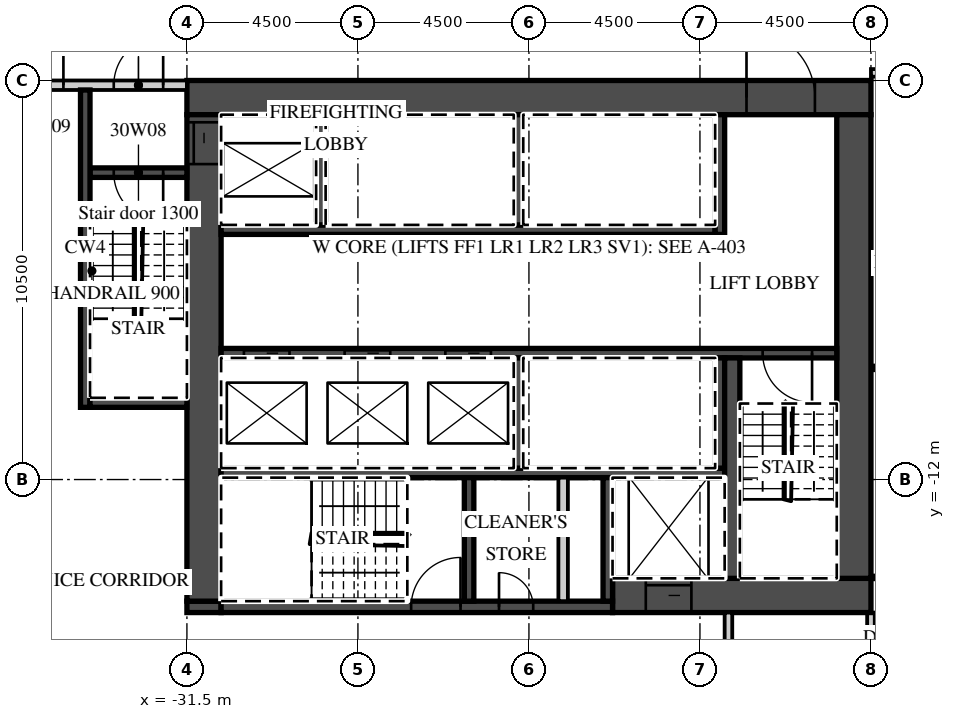
"""IFC4 building model, lengths in metres.
Left out: names, types, materials, properties, quantities, classifications, styles, units other than length and angle.
Written with IfcOpenShell. Run it as: python <this file> out.ifc"""

import sys

from ifc_helpers import new_model, si_unit, direction, frame, frame_2d, origin, place, context, subcontext, project, spatial, rectangle, extrude, element, fill, save


model = new_model("IFC4")
c1 = context("Model", 3, precision=1e-05, world=origin(), true_north=direction((0.0, 1.0)))
c2 = subcontext(c1, "Body", "Model", "MODEL_VIEW")
j1 = project(units=[si_unit("LENGTHUNIT", "METRE"), si_unit("PLANEANGLEUNIT", "RADIAN")], contexts=[c1])
p1 = place(None, origin())
s1 = spatial("IfcSite", under=j1, at=p1, CompositionType="ELEMENT")
p2 = place(p1, origin())
s2 = spatial("IfcBuilding", under=s1, at=p2, CompositionType="ELEMENT")
p3 = place(p2, frame((0.0, 0.0, 133.9)))
s3 = spatial("IfcBuildingStorey", under=s2, at=p3, CompositionType="ELEMENT", Elevation=133.9)
p4 = place(p3, frame((-13.5, -22.232, 0.0), z_axis=(0.0, 0.0, 1.0), x_axis=(0.0, 1.0, 0.0)))
e1 = element("IfcWall", 1, at=p4, inside=s3, PredefinedType="PARTITIONING", context=c2, shape_type="SweptSolid", body=[
    extrude(rectangle(XDim=6.732, YDim=0.2, at=frame_2d((3.366, 0.0))), origin(), (0.0, 0.0, 1.0), 3.02),
])
p5 = place(p3, frame((-13.5, -1.3, 0.0), z_axis=(0.0, 0.0, 1.0), x_axis=(1.0, 0.0, 0.0)))
e2 = element("IfcWall", 2, at=p5, inside=s3, PredefinedType="PARTITIONING", context=c2, shape_type="SweptSolid", body=[
    extrude(rectangle(XDim=60.932, YDim=0.2, at=frame_2d((30.466, 0.0))), origin(), (0.0, 0.0, 1.0), 3.02),
])
p6 = place(p5, frame((2.925, 0.0, 0.0)))
e3 = element("IfcOpeningElement", 3, at=p6, cuts=e2, PredefinedType="OPENING", context=c2, shape_type="SweptSolid", body=[
    extrude(rectangle(XDim=1.0, YDim=2.1, at=frame_2d((0.5, 1.05))), frame((0.0, 0.11, 0.0), z_axis=(0.0, -1.0, 0.0), x_axis=(1.0, 0.0, 0.0)), (0.0, 0.0, 1.0), 0.22),
])
p7 = place(p5, frame((9.863, 0.0, 0.0)))
e4 = element("IfcOpeningElement", 4, at=p7, cuts=e2, PredefinedType="OPENING", context=c2, shape_type="SweptSolid", body=[
    extrude(rectangle(XDim=1.2, YDim=2.1, at=frame_2d((0.6, 1.05))), frame((0.0, 0.11, 0.0), z_axis=(0.0, -1.0, 0.0), x_axis=(1.0, 0.0, 0.0)), (0.0, 0.0, 1.0), 0.22),
])
p8 = place(p5, frame((14.075, 0.0, 0.0)))
e5 = element("IfcOpeningElement", 5, at=p8, cuts=e2, PredefinedType="OPENING", context=c2, shape_type="SweptSolid", body=[
    extrude(rectangle(XDim=1.0, YDim=2.1, at=frame_2d((0.5, 1.05))), frame((0.0, 0.11, 0.0), z_axis=(0.0, -1.0, 0.0), x_axis=(1.0, 0.0, 0.0)), (0.0, 0.0, 1.0), 0.22),
])
p9 = place(p5, frame((18.55, 0.0, 0.0)))
e6 = element("IfcOpeningElement", 6, at=p9, cuts=e2, PredefinedType="OPENING", context=c2, shape_type="SweptSolid", body=[
    extrude(rectangle(XDim=1.0, YDim=2.1, at=frame_2d((0.5, 1.05))), frame((0.0, 0.11, 0.0), z_axis=(0.0, -1.0, 0.0), x_axis=(1.0, 0.0, 0.0)), (0.0, 0.0, 1.0), 0.22),
])
p10 = place(p5, frame((24.938, 0.0, 0.0)))
e7 = element("IfcOpeningElement", 7, at=p10, cuts=e2, PredefinedType="OPENING", context=c2, shape_type="SweptSolid", body=[
    extrude(rectangle(XDim=1.2, YDim=2.1, at=frame_2d((0.6, 1.05))), frame((0.0, 0.11, 0.0), z_axis=(0.0, -1.0, 0.0), x_axis=(1.0, 0.0, 0.0)), (0.0, 0.0, 1.0), 0.22),
])
p11 = place(p5, frame((36.862, 0.0, 0.0)))
e8 = element("IfcOpeningElement", 8, at=p11, cuts=e2, PredefinedType="OPENING", context=c2, shape_type="SweptSolid", body=[
    extrude(rectangle(XDim=1.2, YDim=2.1, at=frame_2d((0.6, 1.05))), frame((0.0, 0.11, 0.0), z_axis=(0.0, -1.0, 0.0), x_axis=(1.0, 0.0, 0.0)), (0.0, 0.0, 1.0), 0.22),
])
p12 = place(p5, frame((41.075, 0.0, 0.0)))
e9 = element("IfcOpeningElement", 9, at=p12, cuts=e2, PredefinedType="OPENING", context=c2, shape_type="SweptSolid", body=[
    extrude(rectangle(XDim=1.0, YDim=2.1, at=frame_2d((0.5, 1.05))), frame((0.0, 0.11, 0.0), z_axis=(0.0, -1.0, 0.0), x_axis=(1.0, 0.0, 0.0)), (0.0, 0.0, 1.0), 0.22),
])
p13 = place(p5, frame((45.55, 0.0, 0.0)))
e10 = element("IfcOpeningElement", 10, at=p13, cuts=e2, PredefinedType="OPENING", context=c2, shape_type="SweptSolid", body=[
    extrude(rectangle(XDim=1.0, YDim=2.1, at=frame_2d((0.5, 1.05))), frame((0.0, 0.11, 0.0), z_axis=(0.0, -1.0, 0.0), x_axis=(1.0, 0.0, 0.0)), (0.0, 0.0, 1.0), 0.22),
])
p14 = place(p5, frame((52.425, 0.0, 0.0)))
e11 = element("IfcOpeningElement", 11, at=p14, cuts=e2, PredefinedType="OPENING", context=c2, shape_type="SweptSolid", body=[
    extrude(rectangle(XDim=1.0, YDim=2.1, at=frame_2d((0.5, 1.05))), frame((0.0, 0.11, 0.0), z_axis=(0.0, -1.0, 0.0), x_axis=(1.0, 0.0, 0.0)), (0.0, 0.0, 1.0), 0.22),
])
p15 = place(p5, frame((56.95, 0.0, 0.0)))
e12 = element("IfcOpeningElement", 12, at=p15, cuts=e2, PredefinedType="OPENING", context=c2, shape_type="SweptSolid", body=[
    extrude(rectangle(XDim=1.0, YDim=2.1, at=frame_2d((0.5, 1.05))), frame((0.0, 0.11, 0.0), z_axis=(0.0, -1.0, 0.0), x_axis=(1.0, 0.0, 0.0)), (0.0, 0.0, 1.0), 0.22),
])
p16 = place(p5, frame((59.882, 0.0, 0.0)))
e13 = element("IfcOpeningElement", 13, at=p16, cuts=e2, PredefinedType="OPENING", context=c2, shape_type="SweptSolid", body=[
    extrude(rectangle(XDim=0.9, YDim=2.1, at=frame_2d((0.45, 1.05))), frame((0.0, 0.11, 0.0), z_axis=(0.0, -1.0, 0.0), x_axis=(1.0, 0.0, 0.0)), (0.0, 0.0, 1.0), 0.22),
])
p17 = place(p3, frame((-31.5, -1.95, 0.0), z_axis=(0.0, 0.0, 1.0), x_axis=(1.0, 0.0, 0.0)))
e14 = element("IfcWall", 14, at=p17, inside=s3, PredefinedType="SHEAR", context=c2, shape_type="SweptSolid", body=[
    extrude(rectangle(XDim=18.0, YDim=0.9, at=frame_2d((9.0, 0.0))), origin(), (0.0, 0.0, 1.0), 3.02),
])
p18 = place(p17, frame((14.725, 0.0, 0.0)))
e15 = element("IfcOpeningElement", 15, at=p18, cuts=e14, PredefinedType="OPENING", context=c2, shape_type="SweptSolid", body=[
    extrude(rectangle(XDim=1.8, YDim=2.1, at=frame_2d((0.9, 1.05))), frame((0.0, 0.46, 0.0), z_axis=(0.0, -1.0, 0.0), x_axis=(1.0, 0.0, 0.0)), (0.0, 0.0, 1.0), 0.92),
])
p19 = place(p3, frame((-20.3, -15.05, 0.0), z_axis=(0.0, 0.0, 1.0), x_axis=(1.0, 0.0, 0.0)))
e16 = element("IfcWall", 16, at=p19, inside=s3, PredefinedType="SHEAR", context=c2, shape_type="SweptSolid", body=[
    extrude(rectangle(XDim=6.8, YDim=0.9, at=frame_2d((3.4, 0.0))), origin(), (0.0, 0.0, 1.0), 3.02),
])
p20 = place(p19, frame((0.875, 0.0, 0.0)))
e17 = element("IfcOpeningElement", 17, at=p20, cuts=e16, PredefinedType="OPENING", context=c2, shape_type="SweptSolid", body=[
    extrude(rectangle(XDim=1.2, YDim=2.1, at=frame_2d((0.6, 1.05))), frame((0.0, 0.46, 0.0), z_axis=(0.0, -1.0, 0.0), x_axis=(1.0, 0.0, 0.0)), (0.0, 0.0, 1.0), 0.92),
])
p21 = place(p3, frame((-31.5, -15.35, 0.0), z_axis=(0.0, 0.0, 1.0), x_axis=(1.0, 0.0, 0.0)))
e18 = element("IfcWall", 18, at=p21, inside=s3, PredefinedType="SHEAR", context=c2, shape_type="SweptSolid", body=[
    extrude(rectangle(XDim=0.9, YDim=0.3, at=frame_2d((0.45, 0.0))), origin(), (0.0, 0.0, 1.0), 3.02),
])
p22 = place(p3, frame((-30.6, -15.35, 0.0), z_axis=(0.0, 0.0, 1.0), x_axis=(1.0, 0.0, 0.0)))
e19 = element("IfcWall", 19, at=p22, inside=s3, PredefinedType="SHEAR", context=c2, shape_type="SweptSolid", body=[
    extrude(rectangle(XDim=10.3, YDim=0.3, at=frame_2d((5.15, 0.0))), origin(), (0.0, 0.0, 1.0), 3.02),
])
p23 = place(p22, frame((5.0, 0.0, 0.0)))
e20 = element("IfcOpeningElement", 20, at=p23, cuts=e19, PredefinedType="OPENING", context=c2, shape_type="SweptSolid", body=[
    extrude(rectangle(XDim=1.3, YDim=2.1, at=frame_2d((0.65, 1.05))), frame((0.0, 0.16, 0.0), z_axis=(0.0, -1.0, 0.0), x_axis=(1.0, 0.0, 0.0)), (0.0, 0.0, 1.0), 0.32),
])
p24 = place(p22, frame((7.312, 0.0, 0.0)))
e21 = element("IfcOpeningElement", 21, at=p24, cuts=e19, PredefinedType="OPENING", context=c2, shape_type="SweptSolid", body=[
    extrude(rectangle(XDim=0.9, YDim=2.1, at=frame_2d((0.45, 1.05))), frame((0.0, 0.16, 0.0), z_axis=(0.0, -1.0, 0.0), x_axis=(1.0, 0.0, 0.0)), (0.0, 0.0, 1.0), 0.32),
])
p25 = place(p3, frame((-31.05, -15.2, 0.0), z_axis=(0.0, 0.0, 1.0), x_axis=(0.0, 1.0, 0.0)))
e22 = element("IfcWall", 22, at=p25, inside=s3, PredefinedType="SHEAR", context=c2, shape_type="SweptSolid", body=[
    extrude(rectangle(XDim=12.8, YDim=0.9, at=frame_2d((6.4, 0.0))), origin(), (0.0, 0.0, 1.0), 3.02),
])
p26 = place(p25, frame((11.5, 0.0, 0.0)))
e23 = element("IfcOpeningElement", 23, at=p26, cuts=e22, PredefinedType="OPENING", context=c2, shape_type="SweptSolid", body=[
    extrude(rectangle(XDim=1.1, YDim=2.1, at=frame_2d((0.55, 1.05))), frame((0.0, 0.46, 0.0), z_axis=(0.0, -1.0, 0.0), x_axis=(1.0, 0.0, 0.0)), (0.0, 0.0, 1.0), 0.92),
])
p27 = place(p3, frame((-13.95, -14.6, 0.0), z_axis=(0.0, 0.0, 1.0), x_axis=(0.0, 1.0, 0.0)))
e24 = element("IfcWall", 24, at=p27, inside=s3, PredefinedType="SHEAR", context=c2, shape_type="SweptSolid", body=[
    extrude(rectangle(XDim=12.2, YDim=0.9, at=frame_2d((6.1, 0.0))), origin(), (0.0, 0.0, 1.0), 3.02),
])
p28 = place(p3, frame((-30.6, -5.425, 0.0), z_axis=(0.0, 0.0, 1.0), x_axis=(1.0, 0.0, 0.0)))
e25 = element("IfcWall", 25, at=p28, inside=s3, PredefinedType="SHEAR", context=c2, shape_type="SweptSolid", body=[
    extrude(rectangle(XDim=13.0, YDim=0.25, at=frame_2d((6.5, 0.0))), origin(), (0.0, 0.0, 1.0), 3.02),
])
p29 = place(p3, frame((-17.475, -5.55, 0.0), z_axis=(0.0, 0.0, 1.0), x_axis=(0.0, 1.0, 0.0)))
e26 = element("IfcWall", 26, at=p29, inside=s3, PredefinedType="SHEAR", context=c2, shape_type="SweptSolid", body=[
    extrude(rectangle(XDim=3.15, YDim=0.25, at=frame_2d((1.575, 0.0))), origin(), (0.0, 0.0, 1.0), 3.02),
])
for number, where, z_axis, x_axis in (
    (27, (-27.975, -5.3, 0.0), (0.0, 0.0, 1.0), (0.0, 1.0, 0.0)),
    (28, (-22.775, -5.3, 0.0), (0.0, 0.0, 1.0), (0.0, 1.0, 0.0)),
):
    element("IfcWall", number, at=place(p3, frame(where, z_axis=z_axis, x_axis=x_axis)), inside=s3, PredefinedType="SHEAR", context=c2, shape_type="SweptSolid", body=[
        extrude(rectangle(XDim=2.9, YDim=0.25, at=frame_2d((1.45, 0.0))), origin(), (0.0, 0.0, 1.0), 3.02),
    ])
p30 = place(p3, frame((-30.6, -8.675, 0.0), z_axis=(0.0, 0.0, 1.0), x_axis=(1.0, 0.0, 0.0)))
e29 = element("IfcWall", 29, at=p30, inside=s3, PredefinedType="SHEAR", context=c2, shape_type="SweptSolid", body=[
    extrude(rectangle(XDim=16.2, YDim=0.25, at=frame_2d((8.1, 0.0))), origin(), (0.0, 0.0, 1.0), 3.02),
])
p31 = place(p30, frame((0.6, 0.0, 0.0)))
e30 = element("IfcOpeningElement", 30, at=p31, cuts=e29, PredefinedType="OPENING", context=c2, shape_type="SweptSolid", body=[
    extrude(rectangle(XDim=1.2, YDim=2.1, at=frame_2d((0.6, 1.05))), frame((0.0, 0.135, 0.0), z_axis=(0.0, -1.0, 0.0), x_axis=(1.0, 0.0, 0.0)), (0.0, 0.0, 1.0), 0.27),
])
p32 = place(p30, frame((3.25, 0.0, 0.0)))
e31 = element("IfcOpeningElement", 31, at=p32, cuts=e29, PredefinedType="OPENING", context=c2, shape_type="SweptSolid", body=[
    extrude(rectangle(XDim=1.2, YDim=2.1, at=frame_2d((0.6, 1.05))), frame((0.0, 0.135, 0.0), z_axis=(0.0, -1.0, 0.0), x_axis=(1.0, 0.0, 0.0)), (0.0, 0.0, 1.0), 0.27),
])
p33 = place(p30, frame((5.9, 0.0, 0.0)))
e32 = element("IfcOpeningElement", 32, at=p33, cuts=e29, PredefinedType="OPENING", context=c2, shape_type="SweptSolid", body=[
    extrude(rectangle(XDim=1.2, YDim=2.1, at=frame_2d((0.6, 1.05))), frame((0.0, 0.135, 0.0), z_axis=(0.0, -1.0, 0.0), x_axis=(1.0, 0.0, 0.0)), (0.0, 0.0, 1.0), 0.27),
])
p34 = place(p30, frame((14.25, 0.0, 0.0)))
e33 = element("IfcOpeningElement", 33, at=p34, cuts=e29, PredefinedType="OPENING", context=c2, shape_type="SweptSolid", body=[
    extrude(rectangle(XDim=1.3, YDim=2.1, at=frame_2d((0.65, 1.05))), frame((0.0, 0.135, 0.0), z_axis=(0.0, -1.0, 0.0), x_axis=(1.0, 0.0, 0.0)), (0.0, 0.0, 1.0), 0.27),
])
p35 = place(p3, frame((-30.6, -11.825, 0.0), z_axis=(0.0, 0.0, 1.0), x_axis=(1.0, 0.0, 0.0)))
e34 = element("IfcWall", 34, at=p35, inside=s3, PredefinedType="SHEAR", context=c2, shape_type="SweptSolid", body=[
    extrude(rectangle(XDim=13.25, YDim=0.25, at=frame_2d((6.625, 0.0))), origin(), (0.0, 0.0, 1.0), 3.02),
])
for number, where, z_axis, x_axis in (
    (35, (-17.475, -11.7, 0.0), (0.0, 0.0, 1.0), (0.0, 1.0, 0.0)),
    (36, (-22.775, -11.7, 0.0), (0.0, 0.0, 1.0), (0.0, 1.0, 0.0)),
):
    element("IfcWall", number, at=place(p3, frame(where, z_axis=z_axis, x_axis=x_axis)), inside=s3, PredefinedType="SHEAR", context=c2, shape_type="SweptSolid", body=[
        extrude(rectangle(XDim=2.9, YDim=0.25, at=frame_2d((1.45, 0.0))), origin(), (0.0, 0.0, 1.0), 3.02),
    ])
p36 = place(p3, frame((-17.15, -14.6, 0.0), z_axis=(0.0, 0.0, 1.0), x_axis=(0.0, 1.0, 0.0)))
e37 = element("IfcWall", 37, at=p36, inside=s3, PredefinedType="SHEAR", context=c2, shape_type="SweptSolid", body=[
    extrude(rectangle(XDim=5.8, YDim=0.4, at=frame_2d((2.9, 0.0))), origin(), (0.0, 0.0, 1.0), 3.02),
])
for number, where, z_axis, x_axis in (
    (38, (-20.425, -15.2, 0.0), (0.0, 0.0, 1.0), (0.0, 1.0, 0.0)),
    (39, (-24.075, -15.2, 0.0), (0.0, 0.0, 1.0), (0.0, 1.0, 0.0)),
):
    element("IfcWall", number, at=place(p3, frame(where, z_axis=z_axis, x_axis=x_axis)), inside=s3, PredefinedType="SHEAR", context=c2, shape_type="SweptSolid", body=[
        extrude(rectangle(XDim=3.25, YDim=0.25, at=frame_2d((1.625, 0.0))), origin(), (0.0, 0.0, 1.0), 3.02),
    ])
p37 = place(p3, frame((-21.6, -15.2, 0.0), z_axis=(0.0, 0.0, 1.0), x_axis=(0.0, 1.0, 0.0)))
e40 = element("IfcWall", 40, at=p37, inside=s3, PredefinedType="PARTITIONING", context=c2, shape_type="SweptSolid", body=[
    extrude(rectangle(XDim=3.25, YDim=0.25, at=frame_2d((1.625, 0.0))), origin(), (0.0, 0.0, 1.0), 3.02),
])
p38 = place(p3, frame((-39.035, -1.625, 0.0), z_axis=(0.0, 0.0, 1.0), x_axis=(1.0, 0.0, 0.0)))
e41 = element("IfcWall", 41, at=p38, inside=s3, PredefinedType="PARTITIONING", context=c2, shape_type="SweptSolid", body=[
    extrude(rectangle(XDim=7.535, YDim=0.25, at=frame_2d((3.768, 0.0))), origin(), (0.0, 0.0, 1.0), 3.02),
])
p39 = place(p38, frame((5.61, 0.0, 0.0)))
e42 = element("IfcOpeningElement", 42, at=p39, cuts=e41, PredefinedType="OPENING", context=c2, shape_type="SweptSolid", body=[
    extrude(rectangle(XDim=1.3, YDim=2.1, at=frame_2d((0.65, 1.05))), frame((0.0, 0.135, 0.0), z_axis=(0.0, -1.0, 0.0), x_axis=(1.0, 0.0, 0.0)), (0.0, 0.0, 1.0), 0.27),
])
p40 = place(p38, frame((3.185, 0.0, 0.0)))
e43 = element("IfcOpeningElement", 43, at=p40, cuts=e41, PredefinedType="OPENING", context=c2, shape_type="SweptSolid", body=[
    extrude(rectangle(XDim=1.1, YDim=2.1, at=frame_2d((0.55, 1.05))), frame((0.0, 0.135, 0.0), z_axis=(0.0, -1.0, 0.0), x_axis=(1.0, 0.0, 0.0)), (0.0, 0.0, 1.0), 0.27),
])
p41 = place(p3, frame((-34.05, -3.925, 0.0), z_axis=(0.0, 0.0, 1.0), x_axis=(1.0, 0.0, 0.0)))
e44 = element("IfcWall", 44, at=p41, inside=s3, PredefinedType="SHEAR", context=c2, shape_type="SweptSolid", body=[
    extrude(rectangle(XDim=2.55, YDim=0.25, at=frame_2d((1.275, 0.0))), origin(), (0.0, 0.0, 1.0), 3.02),
])
p42 = place(p41, frame((0.625, 0.0, 0.0)))
e45 = element("IfcOpeningElement", 45, at=p42, cuts=e44, PredefinedType="OPENING", context=c2, shape_type="SweptSolid", body=[
    extrude(rectangle(XDim=1.3, YDim=2.1, at=frame_2d((0.65, 1.05))), frame((0.0, 0.135, 0.0), z_axis=(0.0, -1.0, 0.0), x_axis=(1.0, 0.0, 0.0)), (0.0, 0.0, 1.0), 0.27),
])
p43 = place(p3, frame((-34.175, -10.1, 0.0), z_axis=(0.0, 0.0, 1.0), x_axis=(0.0, 1.0, 0.0)))
e46 = element("IfcWall", 46, at=p43, inside=s3, PredefinedType="SHEAR", context=c2, shape_type="SweptSolid", body=[
    extrude(rectangle(XDim=8.35, YDim=0.25, at=frame_2d((4.175, 0.0))), origin(), (0.0, 0.0, 1.0), 3.02),
])
p44 = place(p3, frame((-34.05, -9.975, 0.0), z_axis=(0.0, 0.0, 1.0), x_axis=(1.0, 0.0, 0.0)))
e47 = element("IfcWall", 47, at=p44, inside=s3, PredefinedType="SHEAR", context=c2, shape_type="SweptSolid", body=[
    extrude(rectangle(XDim=2.55, YDim=0.25, at=frame_2d((1.275, 0.0))), origin(), (0.0, 0.0, 1.0), 3.02),
])
p45 = place(p3, frame((-17.25, -17.7, 0.0), z_axis=(0.0, 0.0, 1.0), x_axis=(0.0, 1.0, 0.0)))
e48 = element("IfcWall", 48, at=p45, inside=s3, PredefinedType="PARTITIONING", context=c2, shape_type="SweptSolid", body=[
    extrude(rectangle(XDim=2.2, YDim=0.2, at=frame_2d((1.1, 0.0))), origin(), (0.0, 0.0, 1.0), 3.02),
])
p46 = place(p31, origin())
e49 = element("IfcDoor", 49, at=p46, inside=s3, OperationType="SLIDING_TO_LEFT", PredefinedType="DOOR", context=c2, shape_type="SweptSolid", body=[
    extrude(rectangle(XDim=1.2, YDim=2.1, at=frame_2d((0.6, 1.05))), frame((0.0, 0.025, 0.0), z_axis=(0.0, -1.0, 0.0), x_axis=(1.0, 0.0, 0.0)), (0.0, 0.0, 1.0), 0.05),
])
fill(e30, e49)
p47 = place(p32, origin())
e50 = element("IfcDoor", 50, at=p47, inside=s3, OperationType="SLIDING_TO_RIGHT", PredefinedType="DOOR", context=c2, shape_type="SweptSolid", body=[
    extrude(rectangle(XDim=1.2, YDim=2.1, at=frame_2d((0.6, 1.05))), frame((0.0, 0.025, 0.0), z_axis=(0.0, -1.0, 0.0), x_axis=(1.0, 0.0, 0.0)), (0.0, 0.0, 1.0), 0.05),
])
fill(e31, e50)
p48 = place(p33, origin())
e51 = element("IfcDoor", 51, at=p48, inside=s3, OperationType="SLIDING_TO_RIGHT", PredefinedType="DOOR", context=c2, shape_type="SweptSolid", body=[
    extrude(rectangle(XDim=1.2, YDim=2.1, at=frame_2d((0.6, 1.05))), frame((0.0, 0.025, 0.0), z_axis=(0.0, -1.0, 0.0), x_axis=(1.0, 0.0, 0.0)), (0.0, 0.0, 1.0), 0.05),
])
fill(e32, e51)
p49 = place(p20, origin())
e52 = element("IfcDoor", 52, at=p49, inside=s3, OperationType="SLIDING_TO_LEFT", PredefinedType="DOOR", context=c2, shape_type="SweptSolid", body=[
    extrude(rectangle(XDim=1.2, YDim=2.1, at=frame_2d((0.6, 1.05))), frame((0.0, 0.025, 0.0), z_axis=(0.0, -1.0, 0.0), x_axis=(1.0, 0.0, 0.0)), (0.0, 0.0, 1.0), 0.05),
])
fill(e17, e52)
p50 = place(p26, origin())
e53 = element("IfcDoor", 53, at=p50, inside=s3, OperationType="SLIDING_TO_RIGHT", PredefinedType="DOOR", context=c2, shape_type="SweptSolid", body=[
    extrude(rectangle(XDim=1.1, YDim=2.1, at=frame_2d((0.55, 1.05))), frame((0.0, 0.025, 0.0), z_axis=(0.0, -1.0, 0.0), x_axis=(1.0, 0.0, 0.0)), (0.0, 0.0, 1.0), 0.05),
])
fill(e23, e53)
p51 = place(p18, origin())
e54 = element("IfcDoor", 54, at=p51, inside=s3, OperationType="DOUBLE_DOOR_DOUBLE_SWING", PredefinedType="DOOR", context=c2, shape_type="SweptSolid", body=[
    extrude(rectangle(XDim=1.8, YDim=2.1, at=frame_2d((0.9, 1.05))), frame((0.0, 0.025, 0.0), z_axis=(0.0, -1.0, 0.0), x_axis=(1.0, 0.0, 0.0)), (0.0, 0.0, 1.0), 0.05),
])
fill(e15, e54)
p52 = place(p39, origin())
e55 = element("IfcDoor", 55, at=p52, inside=s3, OperationType="SINGLE_SWING_RIGHT", PredefinedType="DOOR", context=c2, shape_type="SweptSolid", body=[
    extrude(rectangle(XDim=1.3, YDim=2.1, at=frame_2d((0.65, 1.05))), frame((0.0, 0.025, 0.0), z_axis=(0.0, -1.0, 0.0), x_axis=(1.0, 0.0, 0.0)), (0.0, 0.0, 1.0), 0.05),
])
fill(e42, e55)
p53 = place(p42, origin())
e56 = element("IfcDoor", 56, at=p53, inside=s3, OperationType="SINGLE_SWING_RIGHT", PredefinedType="DOOR", context=c2, shape_type="SweptSolid", body=[
    extrude(rectangle(XDim=1.3, YDim=2.1, at=frame_2d((0.65, 1.05))), frame((0.0, 0.025, 0.0), z_axis=(0.0, -1.0, 0.0), x_axis=(1.0, 0.0, 0.0)), (0.0, 0.0, 1.0), 0.05),
])
fill(e45, e56)
p54 = place(p40, origin())
e57 = element("IfcDoor", 57, at=p54, inside=s3, OperationType="SINGLE_SWING_RIGHT", PredefinedType="DOOR", context=c2, shape_type="SweptSolid", body=[
    extrude(rectangle(XDim=1.1, YDim=2.1, at=frame_2d((0.55, 1.05))), frame((0.0, 0.025, 0.0), z_axis=(0.0, -1.0, 0.0), x_axis=(1.0, 0.0, 0.0)), (0.0, 0.0, 1.0), 0.05),
])
fill(e43, e57)
p55 = place(p34, origin())
e58 = element("IfcDoor", 58, at=p55, inside=s3, OperationType="SINGLE_SWING_RIGHT", PredefinedType="DOOR", context=c2, shape_type="SweptSolid", body=[
    extrude(rectangle(XDim=1.3, YDim=2.1, at=frame_2d((0.65, 1.05))), frame((0.0, 0.025, 0.0), z_axis=(0.0, -1.0, 0.0), x_axis=(1.0, 0.0, 0.0)), (0.0, 0.0, 1.0), 0.05),
])
fill(e33, e58)
p56 = place(p23, origin())
e59 = element("IfcDoor", 59, at=p56, inside=s3, OperationType="SINGLE_SWING_RIGHT", PredefinedType="DOOR", context=c2, shape_type="SweptSolid", body=[
    extrude(rectangle(XDim=1.3, YDim=2.1, at=frame_2d((0.65, 1.05))), frame((0.0, 0.025, 0.0), z_axis=(0.0, -1.0, 0.0), x_axis=(1.0, 0.0, 0.0)), (0.0, 0.0, 1.0), 0.05),
])
fill(e20, e59)
p57 = place(p24, origin())
e60 = element("IfcDoor", 60, at=p57, inside=s3, OperationType="SINGLE_SWING_LEFT", PredefinedType="DOOR", context=c2, shape_type="SweptSolid", body=[
    extrude(rectangle(XDim=0.9, YDim=2.1, at=frame_2d((0.45, 1.05))), frame((0.0, 0.025, 0.0), z_axis=(0.0, -1.0, 0.0), x_axis=(1.0, 0.0, 0.0)), (0.0, 0.0, 1.0), 0.05),
])
fill(e21, e60)
save(model, sys.argv[1])
